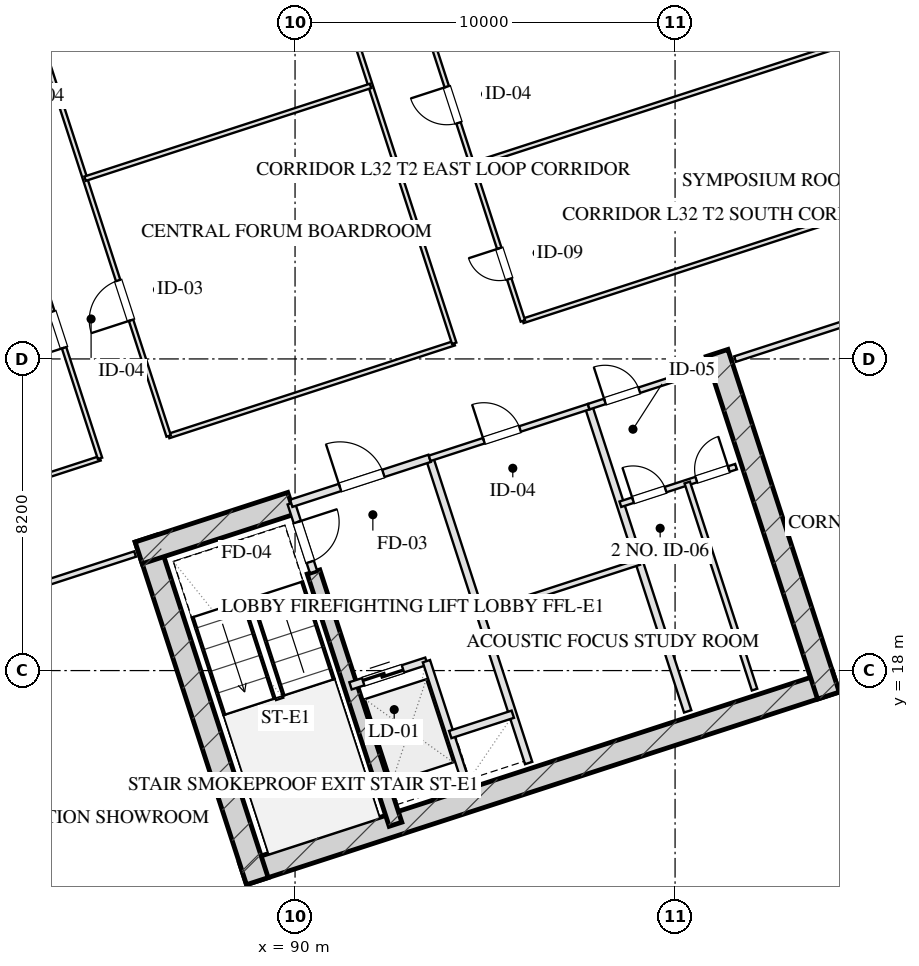
"""IFC4 building model, lengths in metres.
Left out: names, types, materials, properties, quantities, classifications, styles, units other than length and angle.
Written with IfcOpenShell. Run it as: python <this file> out.ifc"""

import sys

from ifc_helpers import new_model, si_unit, direction, frame, frame_2d, origin, place, context, subcontext, project, spatial, rectangle, extrude, element, fill, save


model = new_model("IFC4")
c1 = context("Model", 3, precision=1e-05, world=origin(), true_north=direction((0.0, 1.0)))
c2 = subcontext(c1, "Body", "Model", "MODEL_VIEW")
j1 = project(units=[si_unit("LENGTHUNIT", "METRE"), si_unit("PLANEANGLEUNIT", "RADIAN")], contexts=[c1])
p1 = place(None, origin())
s1 = spatial("IfcSite", under=j1, at=p1, CompositionType="ELEMENT")
p2 = place(p1, origin())
s2 = spatial("IfcBuilding", under=s1, at=p2, CompositionType="ELEMENT")
p3 = place(p2, frame((0.0, 0.0, 124.2)))
s3 = spatial("IfcBuildingStorey", under=s2, at=p3, CompositionType="ELEMENT", Elevation=124.2)
p4 = place(p3, frame((88.63, 12.652, 0.0), z_axis=(0.0, 0.0, 1.0), x_axis=(0.95105714907, 0.309015046886, 0.0)))
e1 = element("IfcWall", 1, at=p4, inside=s3, PredefinedType="SHEAR", context=c2, shape_type="SweptSolid", body=[
    extrude(rectangle(XDim=16.4, YDim=0.6, at=frame_2d((8.2, 0.0))), origin(), (0.0, 0.0, 1.0), 3.45),
])
p5 = place(p3, frame((86.078, 21.475, 0.0), z_axis=(0.0, 0.0, 1.0), x_axis=(0.309017938678, -0.951056209472, 0.0)))
e2 = element("IfcWall", 2, at=p5, inside=s3, PredefinedType="SHEAR", context=c2, shape_type="SweptSolid", body=[
    extrude(rectangle(XDim=9.48, YDim=0.6, at=frame_2d((4.74, 0.0))), origin(), (0.0, 0.0, 1.0), 3.45),
])
p6 = place(p3, frame((101.105, 26.358, 0.0), z_axis=(0.0, 0.0, 1.0), x_axis=(0.309010370028, -0.95105866865, 0.0)))
e3 = element("IfcWall", 3, at=p6, inside=s3, PredefinedType="SHEAR", context=c2, shape_type="SweptSolid", body=[
    extrude(rectangle(XDim=9.48, YDim=0.6, at=frame_2d((4.74, 0.0))), origin(), (0.0, 0.0, 1.0), 3.45),
])
p7 = place(p3, frame((90.486, 20.594, 0.0), z_axis=(0.0, 0.0, 1.0), x_axis=(0.309020428229, -0.951055400562, 0.0)))
e4 = element("IfcWall", 4, at=p7, inside=s3, PredefinedType="SHEAR", context=c2, shape_type="SweptSolid", body=[
    extrude(rectangle(XDim=6.98, YDim=0.35, at=frame_2d((3.49, 0.0))), origin(), (0.0, 0.0, 1.0), 3.45),
])
p8 = place(p3, frame((85.886, 21.097, 0.0), z_axis=(0.0, 0.0, 1.0), x_axis=(0.951068073652, 0.308981422225, 0.0)))
e5 = element("IfcWall", 5, at=p8, inside=s3, PredefinedType="SHEAR", context=c2, shape_type="SweptSolid", body=[
    extrude(rectangle(XDim=4.22, YDim=0.6, at=frame_2d((2.11, 0.0))), origin(), (0.0, 0.0, 1.0), 3.45),
])
p9 = place(p3, frame((99.284, 61.41, 0.0), z_axis=(0.0, 0.0, 1.0), x_axis=(0.309017542002, -0.95105633836, 0.0)))
e6 = element("IfcWall", 6, at=p9, inside=s3, PredefinedType="SOLIDWALL", context=c2, shape_type="SweptSolid", body=[
    extrude(rectangle(XDim=46.4, YDim=0.4, at=frame_2d((23.2, 0.0))), origin(), (0.0, 0.0, 1.0), 2.61),
])
p10 = place(p9, frame((25.25, 0.0, 0.0)))
e7 = element("IfcOpeningElement", 7, at=p10, cuts=e6, PredefinedType="OPENING", context=c2, shape_type="SweptSolid", body=[
    extrude(rectangle(XDim=1.1, YDim=2.15, at=frame_2d((0.55, 1.075))), frame((0.0, 0.21, 0.0), z_axis=(0.0, -1.0, 0.0), x_axis=(1.0, 0.0, 0.0)), (0.0, 0.0, 1.0), 0.42),
])
p11 = place(p3, frame((111.953, 14.005, 0.0), z_axis=(0.0, 0.0, 1.0), x_axis=(-0.95105505922, -0.309021478754, 0.0)))
e8 = element("IfcWall", 8, at=p11, inside=s3, PredefinedType="SOLIDWALL", context=c2, shape_type="SweptSolid", body=[
    extrude(rectangle(XDim=29.4, YDim=0.4, at=frame_2d((14.7, 0.0))), origin(), (0.0, 0.0, 1.0), 2.61),
])
p12 = place(p3, frame((89.899, 22.401, 0.0), z_axis=(0.0, 0.0, 1.0), x_axis=(0.308932062672, -0.951084108086, 0.0)))
e9 = element("IfcWall", 9, at=p12, inside=s3, PredefinedType="PARTITIONING", context=c2, shape_type="SweptSolid", body=[
    extrude(rectangle(XDim=1.9, YDim=0.2, at=frame_2d((0.95, 0.0))), origin(), (0.0, 0.0, 1.0), 3.175),
])
p13 = place(p12, frame((0.52, 0.0, 0.0)))
e10 = element("IfcOpeningElement", 10, at=p13, cuts=e9, PredefinedType="OPENING", context=c2, shape_type="SweptSolid", body=[
    extrude(rectangle(XDim=1.1, YDim=2.05, at=frame_2d((0.55, 1.025))), frame((0.0, 0.11, 0.0), z_axis=(0.0, -1.0, 0.0), x_axis=(1.0, 0.0, 0.0)), (0.0, 0.0, 1.0), 0.22),
])
p14 = place(p3, frame((93.542, 23.585, 0.0), z_axis=(0.0, 0.0, 1.0), x_axis=(0.309042196757, -0.951048327176, 0.0)))
e11 = element("IfcWall", 11, at=p14, inside=s3, PredefinedType="PARTITIONING", context=c2, shape_type="SweptSolid", body=[
    extrude(rectangle(XDim=8.43, YDim=0.2, at=frame_2d((4.215, 0.0))), origin(), (0.0, 0.0, 1.0), 3.175),
])
p15 = place(p3, frame((89.899, 22.401, 0.0), z_axis=(0.0, 0.0, 1.0), x_axis=(0.951046716504, 0.309047153403, 0.0)))
e12 = element("IfcWall", 12, at=p15, inside=s3, PredefinedType="PARTITIONING", context=c2, shape_type="SweptSolid", body=[
    extrude(rectangle(XDim=3.83, YDim=0.2, at=frame_2d((1.915, 0.0))), origin(), (0.0, 0.0, 1.0), 3.175),
])
p16 = place(p15, frame((1.35, 0.0, 0.0)))
e13 = element("IfcOpeningElement", 13, at=p16, cuts=e12, PredefinedType="OPENING", context=c2, shape_type="SweptSolid", body=[
    extrude(rectangle(XDim=1.2, YDim=2.05, at=frame_2d((0.6, 1.025))), frame((0.0, 0.11, 0.0), z_axis=(0.0, -1.0, 0.0), x_axis=(1.0, 0.0, 0.0)), (0.0, 0.0, 1.0), 0.22),
])
p17 = place(p3, frame((91.46, 17.598, 0.0), z_axis=(0.0, 0.0, 1.0), x_axis=(0.951062257173, 0.308999325213, 0.0)))
e14 = element("IfcWall", 14, at=p17, inside=s3, PredefinedType="PARTITIONING", context=c2, shape_type="SweptSolid", body=[
    extrude(rectangle(XDim=2.1, YDim=0.2, at=frame_2d((1.05, 0.0))), origin(), (0.0, 0.0, 1.0), 3.175),
])
p18 = place(p17, frame((0.35, 0.0, 0.0)))
e15 = element("IfcOpeningElement", 15, at=p18, cuts=e14, PredefinedType="OPENING", context=c2, shape_type="SweptSolid", body=[
    extrude(rectangle(XDim=1.1, YDim=2.05, at=frame_2d((0.55, 1.025))), frame((0.0, 0.11, 0.0), z_axis=(0.0, -1.0, 0.0), x_axis=(1.0, 0.0, 0.0)), (0.0, 0.0, 1.0), 0.22),
])
p19 = place(p3, frame((93.457, 18.247, 0.0), z_axis=(0.0, 0.0, 1.0), x_axis=(0.3089935693, -0.951064127245, 0.0)))
e16 = element("IfcWall", 16, at=p19, inside=s3, PredefinedType="PARTITIONING", context=c2, shape_type="SweptSolid", body=[
    extrude(rectangle(XDim=3.7, YDim=0.2, at=frame_2d((1.85, 0.0))), origin(), (0.0, 0.0, 1.0), 3.175),
])
p20 = place(p3, frame((94.084, 16.317, 0.0), z_axis=(0.0, 0.0, 1.0), x_axis=(0.951041328149, 0.309063734775, 0.0)))
e17 = element("IfcWall", 17, at=p20, inside=s3, PredefinedType="PARTITIONING", context=c2, shape_type="SweptSolid", body=[
    extrude(rectangle(XDim=1.73, YDim=0.2, at=frame_2d((0.865, 0.0))), origin(), (0.0, 0.0, 1.0), 3.175),
])
p21 = place(p3, frame((97.727, 24.944, 0.0), z_axis=(0.0, 0.0, 1.0), x_axis=(0.309016001439, -0.951056838919, 0.0)))
e18 = element("IfcWall", 18, at=p21, inside=s3, PredefinedType="PARTITIONING", context=c2, shape_type="SweptSolid", body=[
    extrude(rectangle(XDim=8.43, YDim=0.2, at=frame_2d((4.215, 0.0))), origin(), (0.0, 0.0, 1.0), 3.175),
])
p22 = place(p3, frame((93.542, 23.585, 0.0), z_axis=(0.0, 0.0, 1.0), x_axis=(0.951063829732, 0.308994485023, 0.0)))
e19 = element("IfcWall", 19, at=p22, inside=s3, PredefinedType="PARTITIONING", context=c2, shape_type="SweptSolid", body=[
    extrude(rectangle(XDim=4.4, YDim=0.15, at=frame_2d((2.2, 0.0))), origin(), (0.0, 0.0, 1.0), 3.175),
])
p23 = place(p22, frame((1.5, 0.0, 0.0)))
e20 = element("IfcOpeningElement", 20, at=p23, cuts=e19, PredefinedType="OPENING", context=c2, shape_type="SweptSolid", body=[
    extrude(rectangle(XDim=1.0, YDim=2.05, at=frame_2d((0.5, 1.025))), frame((0.0, 0.085, 0.0), z_axis=(0.0, -1.0, 0.0), x_axis=(1.0, 0.0, 0.0)), (0.0, 0.0, 1.0), 0.17),
])
p24 = place(p3, frame((94.871, 19.495, 0.0), z_axis=(0.0, 0.0, 1.0), x_axis=(0.951042223598, 0.309060979314, 0.0)))
e21 = element("IfcWall", 21, at=p24, inside=s3, PredefinedType="PARTITIONING", context=c2, shape_type="SweptSolid", body=[
    extrude(rectangle(XDim=4.4, YDim=0.15, at=frame_2d((2.2, 0.0))), origin(), (0.0, 0.0, 1.0), 3.175),
])
p25 = place(p3, frame((97.727, 24.944, 0.0), z_axis=(0.0, 0.0, 1.0), x_axis=(0.951036872128, 0.309077446369, 0.0)))
e22 = element("IfcWall", 22, at=p25, inside=s3, PredefinedType="PARTITIONING", context=c2, shape_type="SweptSolid", body=[
    extrude(rectangle(XDim=3.2, YDim=0.15, at=frame_2d((1.6, 0.0))), origin(), (0.0, 0.0, 1.0), 3.175),
])
p26 = place(p25, frame((0.45, 0.0, 0.0)))
e23 = element("IfcOpeningElement", 23, at=p26, cuts=e22, PredefinedType="OPENING", context=c2, shape_type="SweptSolid", body=[
    extrude(rectangle(XDim=0.95, YDim=2.05, at=frame_2d((0.475, 1.025))), frame((0.0, 0.085, 0.0), z_axis=(0.0, -1.0, 0.0), x_axis=(1.0, 0.0, 0.0)), (0.0, 0.0, 1.0), 0.17),
])
p27 = place(p3, frame((98.561, 22.376, 0.0), z_axis=(0.0, 0.0, 1.0), x_axis=(0.95104415986, 0.309055020985, 0.0)))
e24 = element("IfcWall", 24, at=p27, inside=s3, PredefinedType="PARTITIONING", context=c2, shape_type="SweptSolid", body=[
    extrude(rectangle(XDim=3.2, YDim=0.15, at=frame_2d((1.6, 0.0))), origin(), (0.0, 0.0, 1.0), 3.175),
])
p28 = place(p27, frame((0.35, 0.0, 0.0)))
e25 = element("IfcOpeningElement", 25, at=p28, cuts=e24, PredefinedType="OPENING", context=c2, shape_type="SweptSolid", body=[
    extrude(rectangle(XDim=0.9, YDim=2.05, at=frame_2d((0.45, 1.025))), frame((0.0, 0.085, 0.0), z_axis=(0.0, -1.0, 0.0), x_axis=(1.0, 0.0, 0.0)), (0.0, 0.0, 1.0), 0.17),
])
p29 = place(p27, frame((2.1, 0.0, 0.0)))
e26 = element("IfcOpeningElement", 26, at=p29, cuts=e24, PredefinedType="OPENING", context=c2, shape_type="SweptSolid", body=[
    extrude(rectangle(XDim=0.9, YDim=2.05, at=frame_2d((0.45, 1.025))), frame((0.0, 0.085, 0.0), z_axis=(0.0, -1.0, 0.0), x_axis=(1.0, 0.0, 0.0)), (0.0, 0.0, 1.0), 0.17),
])
p30 = place(p3, frame((100.32, 22.948, 0.0), z_axis=(0.0, 0.0, 1.0), x_axis=(0.309035009867, -0.951050662518, 0.0)))
e27 = element("IfcWall", 27, at=p30, inside=s3, PredefinedType="PARTITIONING", context=c2, shape_type="SweptSolid", body=[
    extrude(rectangle(XDim=5.73, YDim=0.15, at=frame_2d((2.865, 0.0))), origin(), (0.0, 0.0, 1.0), 3.175),
])
p31 = place(p3, frame((77.136, 18.254, 0.0), z_axis=(0.0, 0.0, 1.0), x_axis=(0.951057133767, 0.309015093986, 0.0)))
e28 = element("IfcWall", 28, at=p31, inside=s3, PredefinedType="PARTITIONING", context=c2, shape_type="SweptSolid", body=[
    extrude(rectangle(XDim=9.1, YDim=0.15, at=frame_2d((4.55, 0.0))), origin(), (0.0, 0.0, 1.0), 3.175),
])
p32 = place(p31, frame((3.822, 0.0, 0.0)))
e29 = element("IfcOpeningElement", 29, at=p32, cuts=e28, PredefinedType="OPENING", context=c2, shape_type="SweptSolid", body=[
    extrude(rectangle(XDim=1.05, YDim=2.05, at=frame_2d((0.525, 1.025))), frame((0.0, 0.085, 0.0), z_axis=(0.0, -1.0, 0.0), x_axis=(1.0, 0.0, 0.0)), (0.0, 0.0, 1.0), 0.17),
])
p33 = place(p3, frame((101.578, 26.196, 0.0), z_axis=(0.0, 0.0, 1.0), x_axis=(0.951062770994, 0.308997743729, 0.0)))
e30 = element("IfcWall", 30, at=p33, inside=s3, PredefinedType="PARTITIONING", context=c2, shape_type="SweptSolid", body=[
    extrude(rectangle(XDim=8.5, YDim=0.15, at=frame_2d((4.25, 0.0))), origin(), (0.0, 0.0, 1.0), 3.175),
])
p34 = place(p33, frame((3.57, 0.0, 0.0)))
e31 = element("IfcOpeningElement", 31, at=p34, cuts=e30, PredefinedType="OPENING", context=c2, shape_type="SweptSolid", body=[
    extrude(rectangle(XDim=1.0, YDim=2.05, at=frame_2d((0.5, 1.025))), frame((0.0, 0.085, 0.0), z_axis=(0.0, -1.0, 0.0), x_axis=(1.0, 0.0, 0.0)), (0.0, 0.0, 1.0), 0.17),
])
p35 = place(p3, frame((76.308, 20.803, 0.0), z_axis=(0.0, 0.0, 1.0), x_axis=(0.951054001411, 0.309024734286, 0.0)))
e32 = element("IfcWall", 32, at=p35, inside=s3, PredefinedType="PARTITIONING", context=c2, shape_type="SweptSolid", body=[
    extrude(rectangle(XDim=9.0, YDim=0.12, at=frame_2d((4.5, 0.0))), origin(), (0.0, 0.0, 1.0), 3.175),
])
p36 = place(p3, frame((86.675, 24.171, 0.0), z_axis=(0.0, 0.0, 1.0), x_axis=(0.951057231385, 0.309014793547, 0.0)))
e33 = element("IfcWall", 33, at=p36, inside=s3, PredefinedType="PARTITIONING", context=c2, shape_type="SweptSolid", body=[
    extrude(rectangle(XDim=7.9, YDim=0.12, at=frame_2d((3.95, 0.0))), origin(), (0.0, 0.0, 1.0), 3.175),
])
p37 = place(p3, frame((95.995, 27.2, 0.0), z_axis=(0.0, 0.0, 1.0), x_axis=(0.951057589409, 0.309013691651, 0.0)))
e34 = element("IfcWall", 34, at=p37, inside=s3, PredefinedType="PARTITIONING", context=c2, shape_type="SweptSolid", body=[
    extrude(rectangle(XDim=13.5, YDim=0.12, at=frame_2d((6.75, 0.0))), origin(), (0.0, 0.0, 1.0), 3.175),
])
p38 = place(p3, frame((84.867, 23.584, 0.0), z_axis=(0.0, 0.0, 1.0), x_axis=(-0.309022042254, 0.951054876125, 0.0)))
e35 = element("IfcWall", 35, at=p38, inside=s3, PredefinedType="PARTITIONING", context=c2, shape_type="SweptSolid", body=[
    extrude(rectangle(XDim=16.64, YDim=0.12, at=frame_2d((8.32, 0.0))), origin(), (0.0, 0.0, 1.0), 3.175),
])
p39 = place(p38, frame((3.06, 0.0, 0.0)))
e36 = element("IfcOpeningElement", 36, at=p39, cuts=e35, PredefinedType="OPENING", context=c2, shape_type="SweptSolid", body=[
    extrude(rectangle(XDim=1.0, YDim=2.05, at=frame_2d((0.5, 1.025))), frame((0.0, 0.07, 0.0), z_axis=(0.0, -1.0, 0.0), x_axis=(1.0, 0.0, 0.0)), (0.0, 0.0, 1.0), 0.14),
])
p40 = place(p38, frame((9.22, 0.0, 0.0)))
e37 = element("IfcOpeningElement", 37, at=p40, cuts=e35, PredefinedType="OPENING", context=c2, shape_type="SweptSolid", body=[
    extrude(rectangle(XDim=1.0, YDim=2.05, at=frame_2d((0.5, 1.025))), frame((0.0, 0.07, 0.0), z_axis=(0.0, -1.0, 0.0), x_axis=(1.0, 0.0, 0.0)), (0.0, 0.0, 1.0), 0.14),
])
p41 = place(p38, frame((13.98, 0.0, 0.0)))
e38 = element("IfcOpeningElement", 38, at=p41, cuts=e35, PredefinedType="OPENING", context=c2, shape_type="SweptSolid", body=[
    extrude(rectangle(XDim=1.0, YDim=2.05, at=frame_2d((0.5, 1.025))), frame((0.0, 0.07, 0.0), z_axis=(0.0, -1.0, 0.0), x_axis=(1.0, 0.0, 0.0)), (0.0, 0.0, 1.0), 0.14),
])
p42 = place(p3, frame((86.675, 24.171, 0.0), z_axis=(0.0, 0.0, 1.0), x_axis=(-0.309022042254, 0.951054876125, 0.0)))
e39 = element("IfcWall", 39, at=p42, inside=s3, PredefinedType="PARTITIONING", context=c2, shape_type="SweptSolid", body=[
    extrude(rectangle(XDim=16.64, YDim=0.12, at=frame_2d((8.32, 0.0))), origin(), (0.0, 0.0, 1.0), 3.175),
])
p43 = place(p42, frame((3.204, 0.0, 0.0)))
e40 = element("IfcOpeningElement", 40, at=p43, cuts=e39, PredefinedType="OPENING", context=c2, shape_type="SweptSolid", body=[
    extrude(rectangle(XDim=1.1, YDim=2.05, at=frame_2d((0.55, 1.025))), frame((0.0, 0.07, 0.0), z_axis=(0.0, -1.0, 0.0), x_axis=(1.0, 0.0, 0.0)), (0.0, 0.0, 1.0), 0.14),
])
p44 = place(p42, frame((14.264, 0.0, 0.0)))
e41 = element("IfcOpeningElement", 41, at=p44, cuts=e39, PredefinedType="OPENING", context=c2, shape_type="SweptSolid", body=[
    extrude(rectangle(XDim=1.1, YDim=2.05, at=frame_2d((0.55, 1.025))), frame((0.0, 0.07, 0.0), z_axis=(0.0, -1.0, 0.0), x_axis=(1.0, 0.0, 0.0)), (0.0, 0.0, 1.0), 0.14),
])
p45 = place(p3, frame((94.188, 26.613, 0.0), z_axis=(0.0, 0.0, 1.0), x_axis=(-0.30901773025, 0.951056277195, 0.0)))
e42 = element("IfcWall", 42, at=p45, inside=s3, PredefinedType="PARTITIONING", context=c2, shape_type="SweptSolid", body=[
    extrude(rectangle(XDim=16.64, YDim=0.12, at=frame_2d((8.32, 0.0))), origin(), (0.0, 0.0, 1.0), 3.175),
])
p46 = place(p45, frame((9.304, 0.0, 0.0)))
e43 = element("IfcOpeningElement", 43, at=p46, cuts=e42, PredefinedType="OPENING", context=c2, shape_type="SweptSolid", body=[
    extrude(rectangle(XDim=1.1, YDim=2.05, at=frame_2d((0.55, 1.025))), frame((0.0, 0.07, 0.0), z_axis=(0.0, -1.0, 0.0), x_axis=(1.0, 0.0, 0.0)), (0.0, 0.0, 1.0), 0.14),
])
p47 = place(p3, frame((95.995, 27.2, 0.0), z_axis=(0.0, 0.0, 1.0), x_axis=(-0.309022042254, 0.951054876125, 0.0)))
e44 = element("IfcWall", 44, at=p47, inside=s3, PredefinedType="PARTITIONING", context=c2, shape_type="SweptSolid", body=[
    extrude(rectangle(XDim=16.64, YDim=0.12, at=frame_2d((8.32, 0.0))), origin(), (0.0, 0.0, 1.0), 3.175),
])
p48 = place(p47, frame((1.16, 0.0, 0.0)))
e45 = element("IfcOpeningElement", 45, at=p48, cuts=e44, PredefinedType="OPENING", context=c2, shape_type="SweptSolid", body=[
    extrude(rectangle(XDim=0.85, YDim=2.05, at=frame_2d((0.425, 1.025))), frame((0.0, 0.07, 0.0), z_axis=(0.0, -1.0, 0.0), x_axis=(1.0, 0.0, 0.0)), (0.0, 0.0, 1.0), 0.14),
])
p49 = place(p47, frame((5.48, 0.0, 0.0)))
e46 = element("IfcOpeningElement", 46, at=p49, cuts=e44, PredefinedType="OPENING", context=c2, shape_type="SweptSolid", body=[
    extrude(rectangle(XDim=1.0, YDim=2.05, at=frame_2d((0.5, 1.025))), frame((0.0, 0.07, 0.0), z_axis=(0.0, -1.0, 0.0), x_axis=(1.0, 0.0, 0.0)), (0.0, 0.0, 1.0), 0.14),
])
p50 = place(p47, frame((9.48, 0.0, 0.0)))
e47 = element("IfcOpeningElement", 47, at=p50, cuts=e44, PredefinedType="OPENING", context=c2, shape_type="SweptSolid", body=[
    extrude(rectangle(XDim=1.0, YDim=2.05, at=frame_2d((0.5, 1.025))), frame((0.0, 0.07, 0.0), z_axis=(0.0, -1.0, 0.0), x_axis=(1.0, 0.0, 0.0)), (0.0, 0.0, 1.0), 0.14),
])
p51 = place(p47, frame((14.48, 0.0, 0.0)))
e48 = element("IfcOpeningElement", 48, at=p51, cuts=e44, PredefinedType="OPENING", context=c2, shape_type="SweptSolid", body=[
    extrude(rectangle(XDim=1.0, YDim=2.05, at=frame_2d((0.5, 1.025))), frame((0.0, 0.07, 0.0), z_axis=(0.0, -1.0, 0.0), x_axis=(1.0, 0.0, 0.0)), (0.0, 0.0, 1.0), 0.14),
])
p52 = place(p3, frame((84.474, 30.943, 0.0), z_axis=(0.0, 0.0, 1.0), x_axis=(0.951057231385, 0.309014793547, 0.0)))
e49 = element("IfcWall", 49, at=p52, inside=s3, PredefinedType="PARTITIONING", context=c2, shape_type="SweptSolid", body=[
    extrude(rectangle(XDim=7.9, YDim=0.12, at=frame_2d((3.95, 0.0))), origin(), (0.0, 0.0, 1.0), 3.175),
])
p53 = place(p3, frame((94.66, 31.308, 0.0), z_axis=(0.0, 0.0, 1.0), x_axis=(0.951057589409, 0.309013691651, 0.0)))
e50 = element("IfcWall", 50, at=p53, inside=s3, PredefinedType="PARTITIONING", context=c2, shape_type="SweptSolid", body=[
    extrude(rectangle(XDim=13.5, YDim=0.12, at=frame_2d((6.75, 0.0))), origin(), (0.0, 0.0, 1.0), 3.175),
])
p54 = place(p13, origin())
e51 = element("IfcDoor", 51, at=p54, inside=s3, OperationType="SINGLE_SWING_LEFT", PredefinedType="DOOR", context=c2, shape_type="SweptSolid", body=[
    extrude(rectangle(XDim=1.1, YDim=2.05, at=frame_2d((0.55, 1.025))), frame((0.0, 0.025, 0.0), z_axis=(0.0, -1.0, 0.0), x_axis=(1.0, 0.0, 0.0)), (0.0, 0.0, 1.0), 0.05),
])
fill(e10, e51)
p55 = place(p16, origin())
e52 = element("IfcDoor", 52, at=p55, inside=s3, OperationType="SINGLE_SWING_LEFT", PredefinedType="DOOR", context=c2, shape_type="SweptSolid", body=[
    extrude(rectangle(XDim=1.2, YDim=2.05, at=frame_2d((0.6, 1.025))), frame((0.0, 0.025, 0.0), z_axis=(0.0, -1.0, 0.0), x_axis=(1.0, 0.0, 0.0)), (0.0, 0.0, 1.0), 0.05),
])
fill(e13, e52)
p56 = place(p18, origin())
e53 = element("IfcDoor", 53, at=p56, inside=s3, OperationType="DOUBLE_DOOR_SLIDING", PredefinedType="DOOR", context=c2, shape_type="SweptSolid", body=[
    extrude(rectangle(XDim=1.1, YDim=2.05, at=frame_2d((0.55, 1.025))), frame((0.0, 0.025, 0.0), z_axis=(0.0, -1.0, 0.0), x_axis=(1.0, 0.0, 0.0)), (0.0, 0.0, 1.0), 0.05),
])
fill(e15, e53)
p57 = place(p23, origin())
e54 = element("IfcDoor", 54, at=p57, inside=s3, OperationType="SINGLE_SWING_LEFT", PredefinedType="DOOR", context=c2, shape_type="SweptSolid", body=[
    extrude(rectangle(XDim=1.0, YDim=2.05, at=frame_2d((0.5, 1.025))), frame((0.0, 0.025, 0.0), z_axis=(0.0, -1.0, 0.0), x_axis=(1.0, 0.0, 0.0)), (0.0, 0.0, 1.0), 0.05),
])
fill(e20, e54)
p58 = place(p26, origin())
e55 = element("IfcDoor", 55, at=p58, inside=s3, OperationType="SINGLE_SWING_LEFT", PredefinedType="DOOR", context=c2, shape_type="SweptSolid", body=[
    extrude(rectangle(XDim=0.95, YDim=2.05, at=frame_2d((0.475, 1.025))), frame((0.0, 0.025, 0.0), z_axis=(0.0, -1.0, 0.0), x_axis=(1.0, 0.0, 0.0)), (0.0, 0.0, 1.0), 0.05),
])
fill(e23, e55)
p59 = place(p28, origin())
e56 = element("IfcDoor", 56, at=p59, inside=s3, OperationType="SINGLE_SWING_LEFT", PredefinedType="DOOR", context=c2, shape_type="SweptSolid", body=[
    extrude(rectangle(XDim=0.9, YDim=2.05, at=frame_2d((0.45, 1.025))), frame((0.0, 0.025, 0.0), z_axis=(0.0, -1.0, 0.0), x_axis=(1.0, 0.0, 0.0)), (0.0, 0.0, 1.0), 0.05),
])
fill(e25, e56)
p60 = place(p29, origin())
e57 = element("IfcDoor", 57, at=p60, inside=s3, OperationType="SINGLE_SWING_RIGHT", PredefinedType="DOOR", context=c2, shape_type="SweptSolid", body=[
    extrude(rectangle(XDim=0.9, YDim=2.05, at=frame_2d((0.45, 1.025))), frame((0.0, 0.025, 0.0), z_axis=(0.0, -1.0, 0.0), x_axis=(1.0, 0.0, 0.0)), (0.0, 0.0, 1.0), 0.05),
])
fill(e26, e57)
p61 = place(p39, origin())
e58 = element("IfcDoor", 58, at=p61, inside=s3, OperationType="SINGLE_SWING_LEFT", PredefinedType="DOOR", context=c2, shape_type="SweptSolid", body=[
    extrude(rectangle(XDim=1.0, YDim=2.05, at=frame_2d((0.5, 1.025))), frame((0.0, 0.025, 0.0), z_axis=(0.0, -1.0, 0.0), x_axis=(1.0, 0.0, 0.0)), (0.0, 0.0, 1.0), 0.05),
])
fill(e36, e58)
p62 = place(p43, origin())
e59 = element("IfcDoor", 59, at=p62, inside=s3, OperationType="SINGLE_SWING_LEFT", PredefinedType="DOOR", context=c2, shape_type="SweptSolid", body=[
    extrude(rectangle(XDim=1.1, YDim=2.05, at=frame_2d((0.55, 1.025))), frame((0.0, 0.025, 0.0), z_axis=(0.0, -1.0, 0.0), x_axis=(1.0, 0.0, 0.0)), (0.0, 0.0, 1.0), 0.05),
])
fill(e40, e59)
p63 = place(p48, origin())
e60 = element("IfcDoor", 60, at=p63, inside=s3, OperationType="SINGLE_SWING_RIGHT", PredefinedType="DOOR", context=c2, shape_type="SweptSolid", body=[
    extrude(rectangle(XDim=0.85, YDim=2.05, at=frame_2d((0.425, 1.025))), frame((0.0, 0.025, 0.0), z_axis=(0.0, -1.0, 0.0), x_axis=(1.0, 0.0, 0.0)), (0.0, 0.0, 1.0), 0.05),
])
fill(e45, e60)
p64 = place(p49, origin())
e61 = element("IfcDoor", 61, at=p64, inside=s3, OperationType="SINGLE_SWING_RIGHT", PredefinedType="DOOR", context=c2, shape_type="SweptSolid", body=[
    extrude(rectangle(XDim=1.0, YDim=2.05, at=frame_2d((0.5, 1.025))), frame((0.0, 0.025, 0.0), z_axis=(0.0, -1.0, 0.0), x_axis=(1.0, 0.0, 0.0)), (0.0, 0.0, 1.0), 0.05),
])
fill(e46, e61)
save(model, sys.argv[1])
